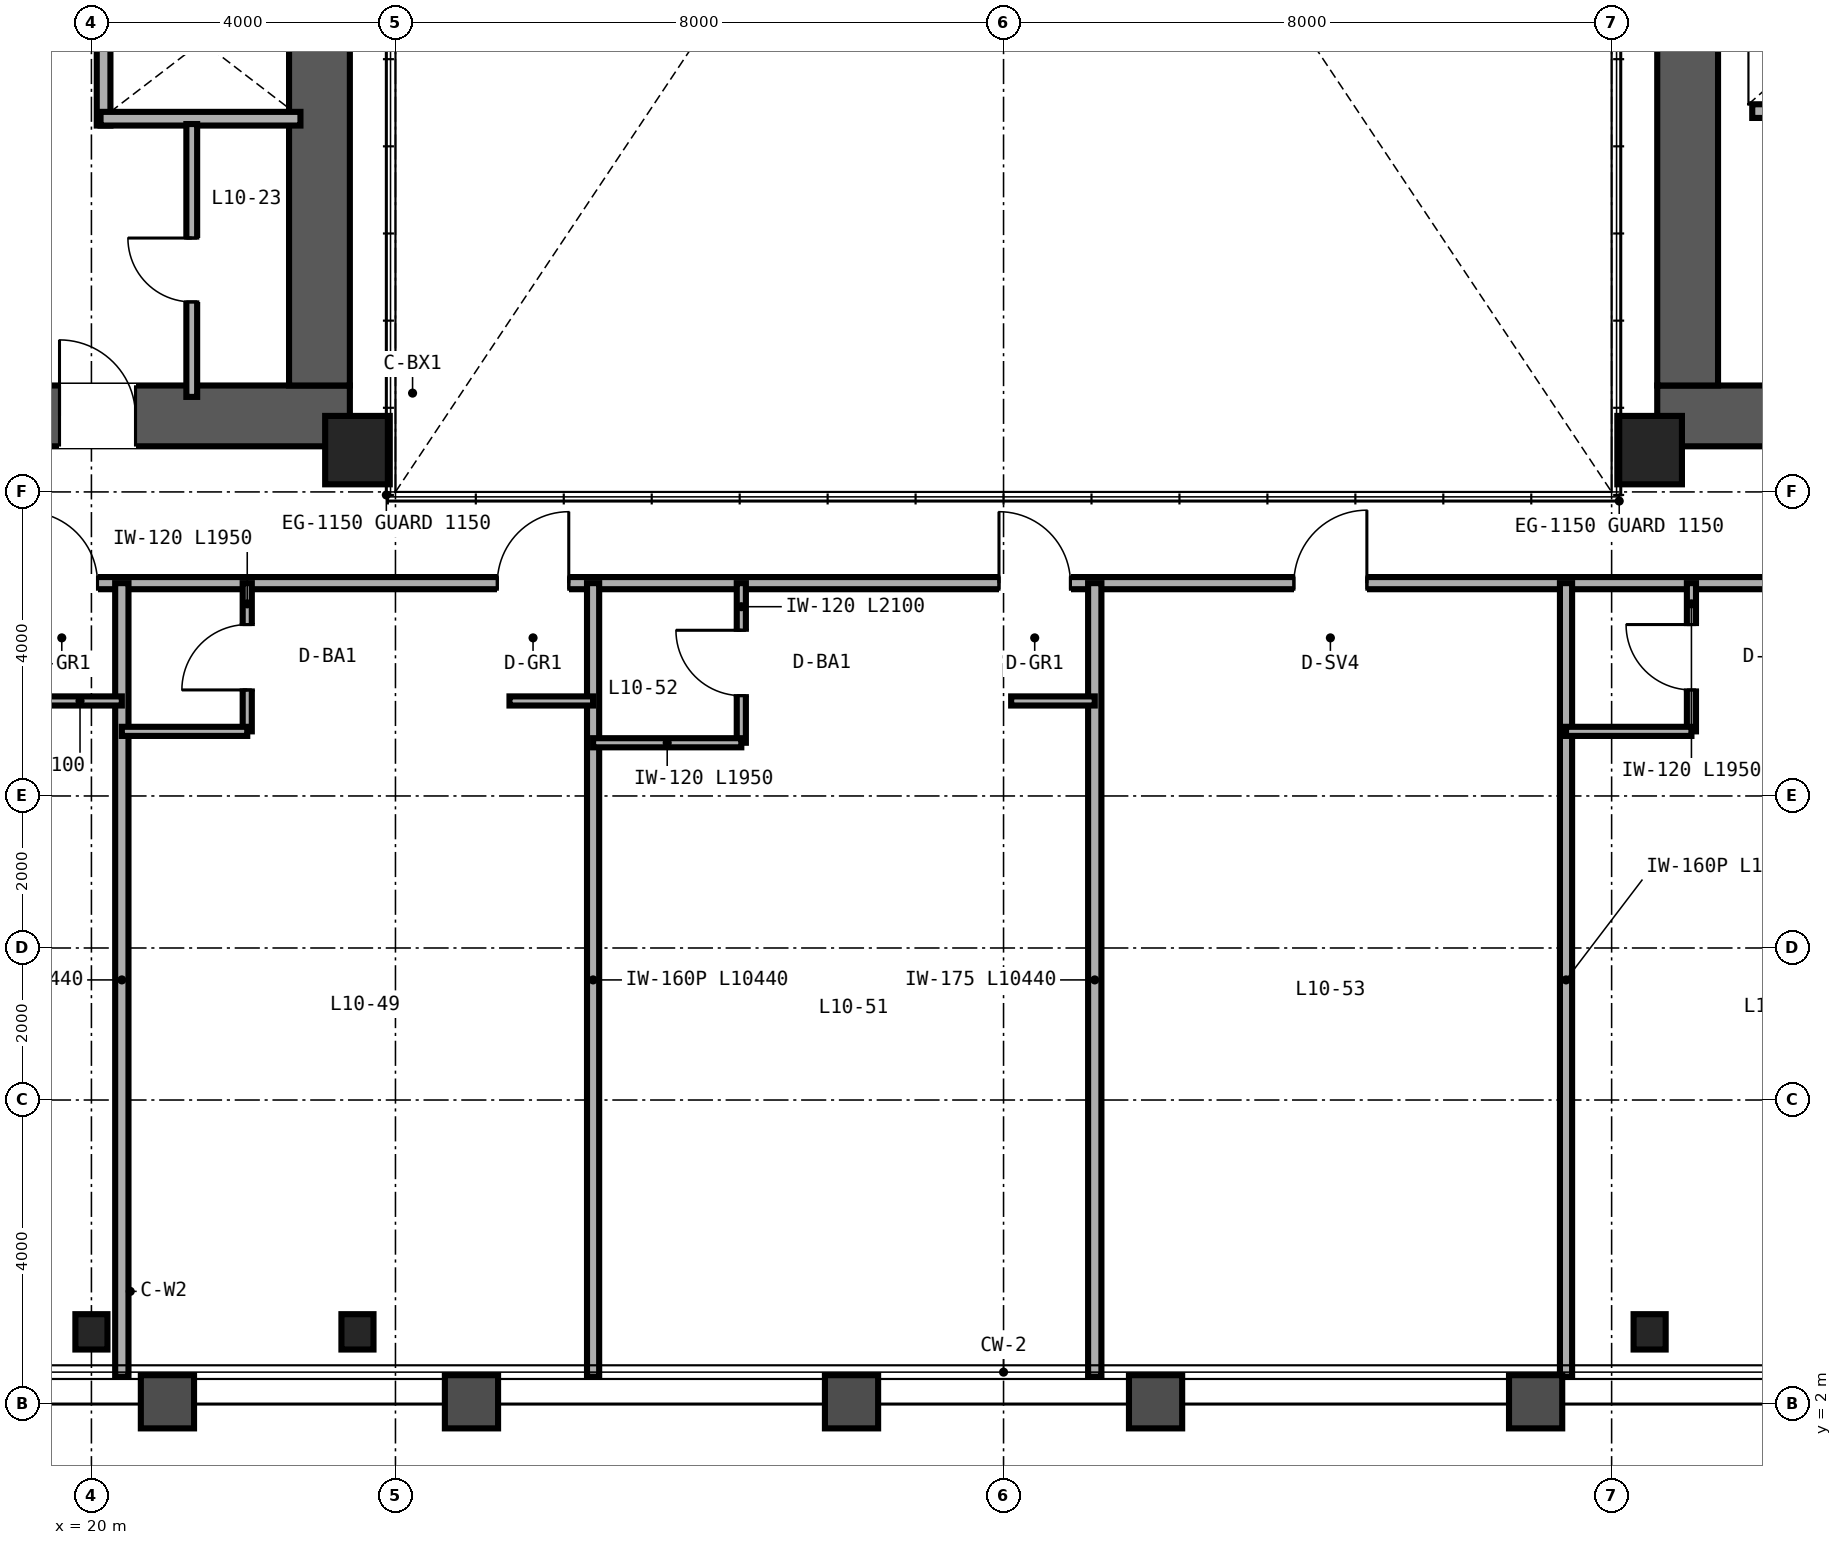
"""IFC4 building model, lengths in metres.
Left out: names, types, materials, properties, quantities, classifications, styles, units other than length and angle.
Written with IfcOpenShell. Run it as: python <this file> out.ifc"""

import sys

from ifc_helpers import new_model, si_unit, direction, frame, frame_2d, origin, origin_2d, place, context, subcontext, project, spatial, rectangle, hollow_rectangle, i_section, extrude, source, transform, mapped, element, fill, save


model = new_model("IFC4")
c1 = context("Model", 3, precision=1e-05, world=origin(), true_north=direction((0.0, 1.0)))
c2 = subcontext(c1, "Body", "Model", "MODEL_VIEW")
j1 = project(units=[si_unit("LENGTHUNIT", "METRE"), si_unit("PLANEANGLEUNIT", "RADIAN")], contexts=[c1])
p1 = place(None, origin())
s1 = spatial("IfcSite", under=j1, at=p1, CompositionType="ELEMENT")
p2 = place(p1, origin())
s2 = spatial("IfcBuilding", under=s1, at=p2, CompositionType="ELEMENT")
p3 = place(p2, frame((0.0, 0.0, 45.6)))
s3 = spatial("IfcBuildingStorey", under=s2, at=p3, CompositionType="ELEMENT", Elevation=45.6)
p4 = place(p3, frame((10.6, 15.0, 0.0), z_axis=(0.0, 0.0, 1.0), x_axis=(1.0, 0.0, 0.0)))
e1 = element("IfcWall", 1, at=p4, inside=s3, PredefinedType="SHEAR", context=c2, shape_type="SweptSolid", body=[
    extrude(rectangle(XDim=12.8, YDim=0.8, at=frame_2d((6.4, 0.0))), origin(), (0.0, 0.0, 1.0), 3.35),
])
p5 = place(p4, frame((8.98, 0.0, 0.0)))
e2 = element("IfcOpeningElement", 2, at=p5, cuts=e1, PredefinedType="OPENING", context=c2, shape_type="SweptSolid", body=[
    extrude(rectangle(XDim=1.0, YDim=2.15, at=frame_2d((0.5, 1.075))), frame((0.0, 0.41, 0.0), z_axis=(0.0, -1.0, 0.0), x_axis=(1.0, 0.0, 0.0)), (0.0, 0.0, 1.0), 0.82),
])
p6 = place(p3, frame((23.0, 15.4, 0.0), z_axis=(0.0, 0.0, 1.0), x_axis=(0.0, 1.0, 0.0)))
e3 = element("IfcWall", 3, at=p6, inside=s3, PredefinedType="SHEAR", context=c2, shape_type="SweptSolid", body=[
    extrude(rectangle(XDim=21.2, YDim=0.8, at=frame_2d((10.6, 0.0))), origin(), (0.0, 0.0, 1.0), 3.35),
])
p7 = place(p3, frame((40.6, 15.0, 0.0), z_axis=(0.0, 0.0, 1.0), x_axis=(1.0, 0.0, 0.0)))
e4 = element("IfcWall", 4, at=p7, inside=s3, PredefinedType="SHEAR", context=c2, shape_type="SweptSolid", body=[
    extrude(rectangle(XDim=12.8, YDim=0.8, at=frame_2d((6.4, 0.0))), origin(), (0.0, 0.0, 1.0), 3.35),
])
p8 = place(p7, frame((4.5, 0.0, 0.0)))
e5 = element("IfcOpeningElement", 5, at=p8, cuts=e4, PredefinedType="OPENING", context=c2, shape_type="SweptSolid", body=[
    extrude(rectangle(XDim=1.0, YDim=2.15, at=frame_2d((0.5, 1.075))), frame((0.0, 0.41, 0.0), z_axis=(0.0, -1.0, 0.0), x_axis=(1.0, 0.0, 0.0)), (0.0, 0.0, 1.0), 0.82),
])
p9 = place(p3, frame((41.0, 15.4, 0.0), z_axis=(0.0, 0.0, 1.0), x_axis=(0.0, 1.0, 0.0)))
e6 = element("IfcWall", 6, at=p9, inside=s3, PredefinedType="SHEAR", context=c2, shape_type="SweptSolid", body=[
    extrude(rectangle(XDim=21.2, YDim=0.8, at=frame_2d((10.6, 0.0))), origin(), (0.0, 0.0, 1.0), 3.35),
])
m1 = source(origin(), c2, "Body", "SweptSolid", [
    extrude(hollow_rectangle(XDim=0.85, YDim=0.9, WallThickness=0.04, at=origin_2d()), origin(), (0.0, 0.0, 1.0), 3.35),
])
for number, where, z_axis, x_axis in (
    (7, (23.5, 14.55, 0.0), (0.0, 0.0, 1.0), (1.0, 0.0, 0.0)),
    (8, (40.5, 14.55, 0.0), (0.0, 0.0, 1.0), (1.0, 0.0, 0.0)),
):
    element("IfcColumn", number, at=place(p3, frame(where, z_axis=z_axis, x_axis=x_axis)), inside=s3, PredefinedType="COLUMN", context=c2, shape_type="MappedRepresentation", body=[
        mapped(m1, transform((0.0, 0.0, 0.0), scale=1.0)),
    ])
m2 = source(origin(), c2, "Body", "SweptSolid", [
    extrude(i_section(OverallWidth=0.422, OverallDepth=0.465, WebThickness=0.045, FlangeThickness=0.073, FilletRadius=0.025, at=origin_2d()), origin(), (0.0, 0.0, 1.0), 3.35),
])
for number, where, z_axis, x_axis in (
    (9, (20.0, 2.95, 0.0), (0.0, 0.0, 1.0), (1.0, 0.0, 0.0)),
    (10, (23.5, 2.95, 0.0), (0.0, 0.0, 1.0), (1.0, 0.0, 0.0)),
    (11, (40.5, 2.95, 0.0), (0.0, 0.0, 1.0), (1.0, 0.0, 0.0)),
):
    element("IfcColumn", number, at=place(p3, frame(where, z_axis=z_axis, x_axis=x_axis)), inside=s3, PredefinedType="COLUMN", context=c2, shape_type="MappedRepresentation", body=[
        mapped(m2, transform((0.0, 0.0, 0.0), scale=1.0)),
    ])
p10 = place(p3, frame((41.85, 19.01, 0.0), z_axis=(0.0, 0.0, 1.0), x_axis=(1.0, 0.0, 0.0)))
e12 = element("IfcWall", 12, at=p10, inside=s3, PredefinedType="SOLIDWALL", context=c2, shape_type="SweptSolid", body=[
    extrude(rectangle(XDim=2.45, YDim=0.18, at=frame_2d((1.225, 0.0))), origin(), (0.0, 0.0, 1.0), 3.35),
])
p11 = place(p3, frame((20.16, 18.82, 0.0), z_axis=(0.0, 0.0, 1.0), x_axis=(0.0, 1.0, 0.0)))
e13 = element("IfcWall", 13, at=p11, inside=s3, PredefinedType="SOLIDWALL", context=c2, shape_type="SweptSolid", body=[
    extrude(rectangle(XDim=6.32, YDim=0.18, at=frame_2d((3.16, 0.0))), origin(), (0.0, 0.0, 1.0), 2.36),
])
p12 = place(p3, frame((20.12, 18.91, 0.0), z_axis=(0.0, 0.0, 1.0), x_axis=(1.0, 0.0, 0.0)))
e14 = element("IfcWall", 14, at=p12, inside=s3, PredefinedType="SOLIDWALL", context=c2, shape_type="SweptSolid", body=[
    extrude(rectangle(XDim=2.63, YDim=0.18, at=frame_2d((1.315, 0.0))), origin(), (0.0, 0.0, 1.0), 3.35),
])
p13 = place(p3, frame((21.32, 15.25, 0.0), z_axis=(0.0, 0.0, 1.0), x_axis=(0.0, 1.0, 0.0)))
e15 = element("IfcWall", 15, at=p13, inside=s3, PredefinedType="PARTITIONING", context=c2, shape_type="SweptSolid", body=[
    extrude(rectangle(XDim=3.59, YDim=0.142, at=frame_2d((1.795, 0.0))), origin(), (0.0, 0.0, 1.0), 3.35),
])
p14 = place(p13, frame((1.25, 0.0, 0.0)))
e16 = element("IfcOpeningElement", 16, at=p14, cuts=e15, PredefinedType="OPENING", context=c2, shape_type="SweptSolid", body=[
    extrude(rectangle(XDim=0.84, YDim=2.1, at=frame_2d((0.42, 1.05))), frame((0.0, 0.081, 0.0), z_axis=(0.0, -1.0, 0.0), x_axis=(1.0, 0.0, 0.0)), (0.0, 0.0, 1.0), 0.162),
])
p15 = place(p3, frame((14.0, 12.8, 0.0), z_axis=(0.0, 0.0, 1.0), x_axis=(1.0, 0.0, 0.0)))
e17 = element("IfcWall", 17, at=p15, inside=s3, PredefinedType="PARTITIONING", context=c2, shape_type="SweptSolid", body=[
    extrude(rectangle(XDim=36.0, YDim=0.16, at=frame_2d((18.0, 0.0))), origin(), (0.0, 0.0, 1.0), 2.571),
])
p16 = place(p15, frame((5.14, 0.0, 0.0)))
e18 = element("IfcOpeningElement", 18, at=p16, cuts=e17, PredefinedType="OPENING", context=c2, shape_type="SweptSolid", body=[
    extrude(rectangle(XDim=0.94, YDim=2.15, at=frame_2d((0.47, 1.075))), frame((0.0, 0.09, 0.0), z_axis=(0.0, -1.0, 0.0), x_axis=(1.0, 0.0, 0.0)), (0.0, 0.0, 1.0), 0.18),
])
p17 = place(p15, frame((11.34, 0.0, 0.0)))
e19 = element("IfcOpeningElement", 19, at=p17, cuts=e17, PredefinedType="OPENING", context=c2, shape_type="SweptSolid", body=[
    extrude(rectangle(XDim=0.94, YDim=2.15, at=frame_2d((0.47, 1.075))), frame((0.0, 0.09, 0.0), z_axis=(0.0, -1.0, 0.0), x_axis=(1.0, 0.0, 0.0)), (0.0, 0.0, 1.0), 0.18),
])
p18 = place(p15, frame((17.94, 0.0, 0.0)))
e20 = element("IfcOpeningElement", 20, at=p18, cuts=e17, PredefinedType="OPENING", context=c2, shape_type="SweptSolid", body=[
    extrude(rectangle(XDim=0.94, YDim=2.15, at=frame_2d((0.47, 1.075))), frame((0.0, 0.09, 0.0), z_axis=(0.0, -1.0, 0.0), x_axis=(1.0, 0.0, 0.0)), (0.0, 0.0, 1.0), 0.18),
])
p19 = place(p15, frame((21.82, 0.0, 0.0)))
e21 = element("IfcOpeningElement", 21, at=p19, cuts=e17, PredefinedType="OPENING", context=c2, shape_type="SweptSolid", body=[
    extrude(rectangle(XDim=0.96, YDim=2.15, at=frame_2d((0.48, 1.075))), frame((0.0, 0.09, 0.0), z_axis=(0.0, -1.0, 0.0), x_axis=(1.0, 0.0, 0.0)), (0.0, 0.0, 1.0), 0.18),
])
p20 = place(p15, frame((29.54, 0.0, 0.0)))
e22 = element("IfcOpeningElement", 22, at=p20, cuts=e17, PredefinedType="OPENING", context=c2, shape_type="SweptSolid", body=[
    extrude(rectangle(XDim=0.94, YDim=2.15, at=frame_2d((0.47, 1.075))), frame((0.0, 0.09, 0.0), z_axis=(0.0, -1.0, 0.0), x_axis=(1.0, 0.0, 0.0)), (0.0, 0.0, 1.0), 0.18),
])
p21 = place(p15, frame((32.92, 0.0, 0.0)))
e23 = element("IfcOpeningElement", 23, at=p21, cuts=e17, PredefinedType="OPENING", context=c2, shape_type="SweptSolid", body=[
    extrude(rectangle(XDim=0.96, YDim=2.15, at=frame_2d((0.48, 1.075))), frame((0.0, 0.09, 0.0), z_axis=(0.0, -1.0, 0.0), x_axis=(1.0, 0.0, 0.0)), (0.0, 0.0, 1.0), 0.18),
])
p22 = place(p3, frame((20.4, 2.36, 0.0), z_axis=(0.0, 0.0, 1.0), x_axis=(0.0, 1.0, 0.0)))
e24 = element("IfcWall", 24, at=p22, inside=s3, PredefinedType="PARTITIONING", context=c2, shape_type="SweptSolid", body=[
    extrude(rectangle(XDim=10.44, YDim=0.175, at=frame_2d((5.22, 0.0))), origin(), (0.0, 0.0, 1.0), 2.813),
])
p23 = place(p3, frame((19.3, 11.25, 0.0), z_axis=(0.0, 0.0, 1.0), x_axis=(1.0, 0.0, 0.0)))
e25 = element("IfcWall", 25, at=p23, inside=s3, PredefinedType="PARTITIONING", context=c2, shape_type="SweptSolid", body=[
    extrude(rectangle(XDim=1.1, YDim=0.12, at=frame_2d((0.55, 0.0))), origin(), (0.0, 0.0, 1.0), 3.35),
])
p24 = place(p3, frame((26.6, 2.36, 0.0), z_axis=(0.0, 0.0, 1.0), x_axis=(0.0, 1.0, 0.0)))
e26 = element("IfcWall", 26, at=p24, inside=s3, PredefinedType="PARTITIONING", context=c2, shape_type="SweptSolid", body=[
    extrude(rectangle(XDim=10.44, YDim=0.16, at=frame_2d((5.22, 0.0))), origin(), (0.0, 0.0, 1.0), 2.423),
])
p25 = place(p3, frame((22.05, 10.85, 0.0), z_axis=(0.0, 0.0, 1.0), x_axis=(0.0, 1.0, 0.0)))
e27 = element("IfcWall", 27, at=p25, inside=s3, PredefinedType="PARTITIONING", context=c2, shape_type="SweptSolid", body=[
    extrude(rectangle(XDim=1.95, YDim=0.12, at=frame_2d((0.975, 0.0))), origin(), (0.0, 0.0, 1.0), 3.35),
])
p26 = place(p25, frame((0.545, 0.0, 0.0)))
e28 = element("IfcOpeningElement", 28, at=p26, cuts=e27, PredefinedType="OPENING", context=c2, shape_type="SweptSolid", body=[
    extrude(rectangle(XDim=0.86, YDim=2.1, at=frame_2d((0.43, 1.05))), frame((0.0, 0.07, 0.0), z_axis=(0.0, -1.0, 0.0), x_axis=(1.0, 0.0, 0.0)), (0.0, 0.0, 1.0), 0.14),
])
p27 = place(p3, frame((20.4, 10.85, 0.0), z_axis=(0.0, 0.0, 1.0), x_axis=(1.0, 0.0, 0.0)))
e29 = element("IfcWall", 29, at=p27, inside=s3, PredefinedType="PARTITIONING", context=c2, shape_type="SweptSolid", body=[
    extrude(rectangle(XDim=1.65, YDim=0.12, at=frame_2d((0.825, 0.0))), origin(), (0.0, 0.0, 1.0), 3.35),
])
p28 = place(p3, frame((25.5, 11.25, 0.0), z_axis=(0.0, 0.0, 1.0), x_axis=(1.0, 0.0, 0.0)))
e30 = element("IfcWall", 30, at=p28, inside=s3, PredefinedType="PARTITIONING", context=c2, shape_type="SweptSolid", body=[
    extrude(rectangle(XDim=1.1, YDim=0.12, at=frame_2d((0.55, 0.0))), origin(), (0.0, 0.0, 1.0), 3.35),
])
p29 = place(p3, frame((33.2, 2.36, 0.0), z_axis=(0.0, 0.0, 1.0), x_axis=(0.0, 1.0, 0.0)))
e31 = element("IfcWall", 31, at=p29, inside=s3, PredefinedType="PARTITIONING", context=c2, shape_type="SweptSolid", body=[
    extrude(rectangle(XDim=10.44, YDim=0.175, at=frame_2d((5.22, 0.0))), origin(), (0.0, 0.0, 1.0), 2.423),
])
p30 = place(p3, frame((28.55, 10.7, 0.0), z_axis=(0.0, 0.0, 1.0), x_axis=(0.0, 1.0, 0.0)))
e32 = element("IfcWall", 32, at=p30, inside=s3, PredefinedType="PARTITIONING", context=c2, shape_type="SweptSolid", body=[
    extrude(rectangle(XDim=2.1, YDim=0.12, at=frame_2d((1.05, 0.0))), origin(), (0.0, 0.0, 1.0), 3.35),
])
p31 = place(p30, frame((0.62, 0.0, 0.0)))
e33 = element("IfcOpeningElement", 33, at=p31, cuts=e32, PredefinedType="OPENING", context=c2, shape_type="SweptSolid", body=[
    extrude(rectangle(XDim=0.86, YDim=2.1, at=frame_2d((0.43, 1.05))), frame((0.0, 0.07, 0.0), z_axis=(0.0, -1.0, 0.0), x_axis=(1.0, 0.0, 0.0)), (0.0, 0.0, 1.0), 0.14),
])
p32 = place(p3, frame((26.6, 10.7, 0.0), z_axis=(0.0, 0.0, 1.0), x_axis=(1.0, 0.0, 0.0)))
e34 = element("IfcWall", 34, at=p32, inside=s3, PredefinedType="PARTITIONING", context=c2, shape_type="SweptSolid", body=[
    extrude(rectangle(XDim=1.95, YDim=0.12, at=frame_2d((0.975, 0.0))), origin(), (0.0, 0.0, 1.0), 3.35),
])
p33 = place(p3, frame((32.1, 11.25, 0.0), z_axis=(0.0, 0.0, 1.0), x_axis=(1.0, 0.0, 0.0)))
e35 = element("IfcWall", 35, at=p33, inside=s3, PredefinedType="PARTITIONING", context=c2, shape_type="SweptSolid", body=[
    extrude(rectangle(XDim=1.1, YDim=0.12, at=frame_2d((0.55, 0.0))), origin(), (0.0, 0.0, 1.0), 3.35),
])
p34 = place(p3, frame((39.4, 2.36, 0.0), z_axis=(0.0, 0.0, 1.0), x_axis=(0.0, 1.0, 0.0)))
e36 = element("IfcWall", 36, at=p34, inside=s3, PredefinedType="PARTITIONING", context=c2, shape_type="SweptSolid", body=[
    extrude(rectangle(XDim=10.44, YDim=0.16, at=frame_2d((5.22, 0.0))), origin(), (0.0, 0.0, 1.0), 2.423),
])
p35 = place(p3, frame((41.05, 10.85, 0.0), z_axis=(0.0, 0.0, 1.0), x_axis=(0.0, 1.0, 0.0)))
e37 = element("IfcWall", 37, at=p35, inside=s3, PredefinedType="PARTITIONING", context=c2, shape_type="SweptSolid", body=[
    extrude(rectangle(XDim=1.95, YDim=0.12, at=frame_2d((0.975, 0.0))), origin(), (0.0, 0.0, 1.0), 3.35),
])
p36 = place(p35, frame((0.545, 0.0, 0.0)))
e38 = element("IfcOpeningElement", 38, at=p36, cuts=e37, PredefinedType="OPENING", context=c2, shape_type="SweptSolid", body=[
    extrude(rectangle(XDim=0.86, YDim=2.1, at=frame_2d((0.43, 1.05))), frame((0.0, 0.07, 0.0), z_axis=(0.0, -1.0, 0.0), x_axis=(1.0, 0.0, 0.0)), (0.0, 0.0, 1.0), 0.14),
])
p37 = place(p3, frame((39.4, 10.85, 0.0), z_axis=(0.0, 0.0, 1.0), x_axis=(1.0, 0.0, 0.0)))
e39 = element("IfcWall", 39, at=p37, inside=s3, PredefinedType="PARTITIONING", context=c2, shape_type="SweptSolid", body=[
    extrude(rectangle(XDim=1.65, YDim=0.12, at=frame_2d((0.825, 0.0))), origin(), (0.0, 0.0, 1.0), 2.571),
])
m3 = source(origin(), c2, "Body", "SweptSolid", [
    extrude(rectangle(XDim=0.84, YDim=2.1, at=frame_2d((0.42, 1.05))), frame((0.0, 0.025, 0.0), z_axis=(0.0, -1.0, 0.0), x_axis=(1.0, 0.0, 0.0)), (0.0, 0.0, 1.0), 0.05),
])
p38 = place(p14, origin())
e40 = element("IfcDoor", 40, at=p38, inside=s3, OperationType="SINGLE_SWING_RIGHT", PredefinedType="DOOR", context=c2, shape_type="MappedRepresentation", body=[
    mapped(m3, transform((0.0, 0.0, 0.0), scale=1.0)),
])
fill(e16, e40)
m4 = source(origin(), c2, "Body", "SweptSolid", [
    extrude(rectangle(XDim=1.0, YDim=2.15, at=frame_2d((0.5, 1.075))), frame((0.0, 0.025, 0.0), z_axis=(0.0, -1.0, 0.0), x_axis=(1.0, 0.0, 0.0)), (0.0, 0.0, 1.0), 0.05),
])
p39 = place(p5, origin())
e41 = element("IfcDoor", 41, at=p39, inside=s3, OperationType="SINGLE_SWING_LEFT", PredefinedType="DOOR", context=c2, shape_type="MappedRepresentation", body=[
    mapped(m4, transform((0.0, 0.0, 0.0), scale=1.0)),
])
fill(e2, e41)
m5 = source(origin(), c2, "Body", "SweptSolid", [
    extrude(rectangle(XDim=0.86, YDim=2.1, at=frame_2d((0.43, 1.05))), frame((0.0, 0.025, 0.0), z_axis=(0.0, -1.0, 0.0), x_axis=(1.0, 0.0, 0.0)), (0.0, 0.0, 1.0), 0.05),
])
p40 = place(p26, origin())
e42 = element("IfcDoor", 42, at=p40, inside=s3, OperationType="SINGLE_SWING_LEFT", PredefinedType="DOOR", context=c2, shape_type="MappedRepresentation", body=[
    mapped(m5, transform((0.0, 0.0, 0.0), scale=1.0)),
])
fill(e28, e42)
p41 = place(p31, origin())
e43 = element("IfcDoor", 43, at=p41, inside=s3, OperationType="SINGLE_SWING_RIGHT", PredefinedType="DOOR", context=c2, shape_type="MappedRepresentation", body=[
    mapped(m5, transform((0.0, 0.0, 0.0), scale=1.0)),
])
fill(e33, e43)
p42 = place(p36, origin())
e44 = element("IfcDoor", 44, at=p42, inside=s3, OperationType="SINGLE_SWING_RIGHT", PredefinedType="DOOR", context=c2, shape_type="MappedRepresentation", body=[
    mapped(m5, transform((0.0, 0.0, 0.0), scale=1.0)),
])
fill(e38, e44)
m6 = source(origin(), c2, "Body", "SweptSolid", [
    extrude(rectangle(XDim=0.94, YDim=2.15, at=frame_2d((0.47, 1.075))), frame((0.0, 0.025, 0.0), z_axis=(0.0, -1.0, 0.0), x_axis=(1.0, 0.0, 0.0)), (0.0, 0.0, 1.0), 0.05),
])
p43 = place(p16, origin())
e45 = element("IfcDoor", 45, at=p43, inside=s3, OperationType="SINGLE_SWING_LEFT", PredefinedType="DOOR", context=c2, shape_type="MappedRepresentation", body=[
    mapped(m6, transform((0.0, 0.0, 0.0), scale=1.0)),
])
fill(e18, e45)
p44 = place(p17, origin())
e46 = element("IfcDoor", 46, at=p44, inside=s3, OperationType="SINGLE_SWING_RIGHT", PredefinedType="DOOR", context=c2, shape_type="MappedRepresentation", body=[
    mapped(m6, transform((0.0, 0.0, 0.0), scale=1.0)),
])
fill(e19, e46)
p45 = place(p18, origin())
e47 = element("IfcDoor", 47, at=p45, inside=s3, OperationType="SINGLE_SWING_LEFT", PredefinedType="DOOR", context=c2, shape_type="MappedRepresentation", body=[
    mapped(m6, transform((0.0, 0.0, 0.0), scale=1.0)),
])
fill(e20, e47)
m7 = source(origin(), c2, "Body", "SweptSolid", [
    extrude(rectangle(XDim=0.96, YDim=2.15, at=frame_2d((0.48, 1.075))), frame((0.0, 0.025, 0.0), z_axis=(0.0, -1.0, 0.0), x_axis=(1.0, 0.0, 0.0)), (0.0, 0.0, 1.0), 0.05),
])
p46 = place(p19, origin())
e48 = element("IfcDoor", 48, at=p46, inside=s3, OperationType="SINGLE_SWING_RIGHT", PredefinedType="DOOR", context=c2, shape_type="MappedRepresentation", body=[
    mapped(m7, transform((0.0, 0.0, 0.0), scale=1.0)),
])
fill(e21, e48)
save(model, sys.argv[1])
